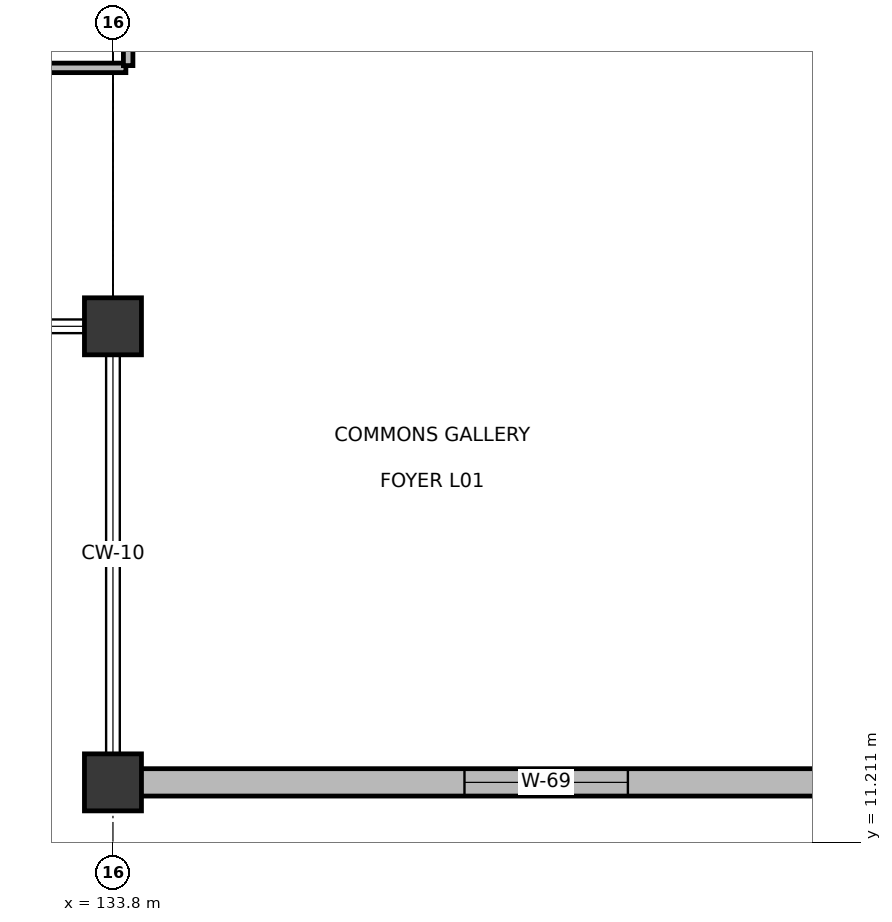
"""IFC4 building model, lengths in metres.
Left out: names, types, materials, properties, quantities, classifications, styles, units other than length and angle.
Written with IfcOpenShell. Run it as: python <this file> out.ifc"""

import sys

from ifc_helpers import new_model, si_unit, direction, frame, frame_2d, origin, origin_2d, place, context, subcontext, project, spatial, rectangle, extrude, element, fill, save


model = new_model("IFC4")
c1 = context("Model", 3, precision=1e-05, world=origin(), true_north=direction((0.0, 1.0)))
c2 = subcontext(c1, "Body", "Model", "MODEL_VIEW")
j1 = project(units=[si_unit("LENGTHUNIT", "METRE"), si_unit("PLANEANGLEUNIT", "RADIAN")], contexts=[c1])
p1 = place(None, origin())
s1 = spatial("IfcSite", under=j1, at=p1, CompositionType="ELEMENT")
p2 = place(p1, origin())
s2 = spatial("IfcBuilding", under=s1, at=p2, CompositionType="ELEMENT")
p3 = place(p2, frame((0.0, 0.0, 5.4)))
s3 = spatial("IfcBuildingStorey", under=s2, at=p3, CompositionType="ELEMENT", Elevation=5.4)
for number, where, z_axis, x_axis in (
    (1, (133.8, 18.0, 0.0), (0.0, 0.0, 1.0), (1.0, 0.0, 0.0)),
    (2, (133.8, 12.0, 0.0), (0.0, 0.0, 1.0), (1.0, 0.0, 0.0)),
):
    element("IfcColumn", number, at=place(p3, frame(where, z_axis=z_axis, x_axis=x_axis)), inside=s3, PredefinedType="COLUMN", context=c2, shape_type="SweptSolid", body=[
        extrude(rectangle(XDim=0.75, YDim=0.75, at=origin_2d()), origin(), (0.0, 0.0, 1.0), 4.8),
    ])
p4 = place(p3, frame((134.165, 12.0, 0.0), z_axis=(0.0, 0.0, 1.0), x_axis=(1.0, 0.0, 0.0)))
e3 = element("IfcWall", 3, at=p4, inside=s3, PredefinedType="SOLIDWALL", context=c2, shape_type="SweptSolid", body=[
    extrude(rectangle(XDim=10.67, YDim=0.36, at=frame_2d((5.335, 0.0))), origin(), (0.0, 0.0, 1.0), 3.675),
])
p5 = place(p4, frame((4.26, 0.0, 0.85)))
e4 = element("IfcOpeningElement", 4, at=p5, cuts=e3, PredefinedType="OPENING", context=c2, shape_type="SweptSolid", body=[
    extrude(rectangle(XDim=2.15, YDim=1.15, at=frame_2d((1.075, 0.575))), frame((0.0, 0.19, 0.0), z_axis=(0.0, -1.0, 0.0), x_axis=(1.0, 0.0, 0.0)), (0.0, 0.0, 1.0), 0.38),
])
p6 = place(p3, frame((119.73, 21.4, 0.0), z_axis=(0.0, 0.0, 1.0), x_axis=(1.0, 0.0, 0.0)))
e5 = element("IfcWall", 5, at=p6, inside=s3, PredefinedType="PARTITIONING", context=c2, shape_type="SweptSolid", body=[
    extrude(rectangle(XDim=14.24, YDim=0.125, at=frame_2d((7.12, 0.0))), origin(), (0.0, 0.0, 1.0), 3.825),
])
p7 = place(p6, frame((6.62, 0.0, 0.0)))
e6 = element("IfcOpeningElement", 6, at=p7, cuts=e5, PredefinedType="OPENING", context=c2, shape_type="SweptSolid", body=[
    extrude(rectangle(XDim=1.0, YDim=2.15, at=frame_2d((0.5, 1.075))), frame((0.0, 0.073, 0.0), z_axis=(0.0, -1.0, 0.0), x_axis=(1.0, 0.0, 0.0)), (0.0, 0.0, 1.0), 0.145),
])
p8 = place(p3, frame((134.0, 21.43, 0.0), z_axis=(0.0, 0.0, 1.0), x_axis=(0.0, 1.0, 0.0)))
e7 = element("IfcWall", 7, at=p8, inside=s3, PredefinedType="PARTITIONING", context=c2, shape_type="SweptSolid", body=[
    extrude(rectangle(XDim=2.54, YDim=0.125, at=frame_2d((1.27, 0.0))), origin(), (0.0, 0.0, 1.0), 3.825),
])
p9 = place(p8, frame((0.41, 0.0, 0.0)))
e8 = element("IfcOpeningElement", 8, at=p9, cuts=e7, PredefinedType="OPENING", context=c2, shape_type="SweptSolid", body=[
    extrude(rectangle(XDim=1.0, YDim=2.15, at=frame_2d((0.5, 1.075))), frame((0.0, 0.073, 0.0), z_axis=(0.0, -1.0, 0.0), x_axis=(1.0, 0.0, 0.0)), (0.0, 0.0, 1.0), 0.145),
])
p10 = place(p5, frame((2.15, 0.0, 0.0), z_axis=(0.0, 0.0, 1.0), x_axis=(-1.0, 0.0, 0.0)))
e9 = element("IfcWindow", 9, at=p10, inside=s3, PartitioningType="DOUBLE_PANEL_VERTICAL", PredefinedType="WINDOW", context=c2, shape_type="SweptSolid", body=[
    extrude(rectangle(XDim=2.15, YDim=1.15, at=frame_2d((1.075, 0.575))), frame((0.0, 0.03, 0.0), z_axis=(0.0, -1.0, 0.0), x_axis=(1.0, 0.0, 0.0)), (0.0, 0.0, 1.0), 0.06),
])
fill(e4, e9)
save(model, sys.argv[1])
